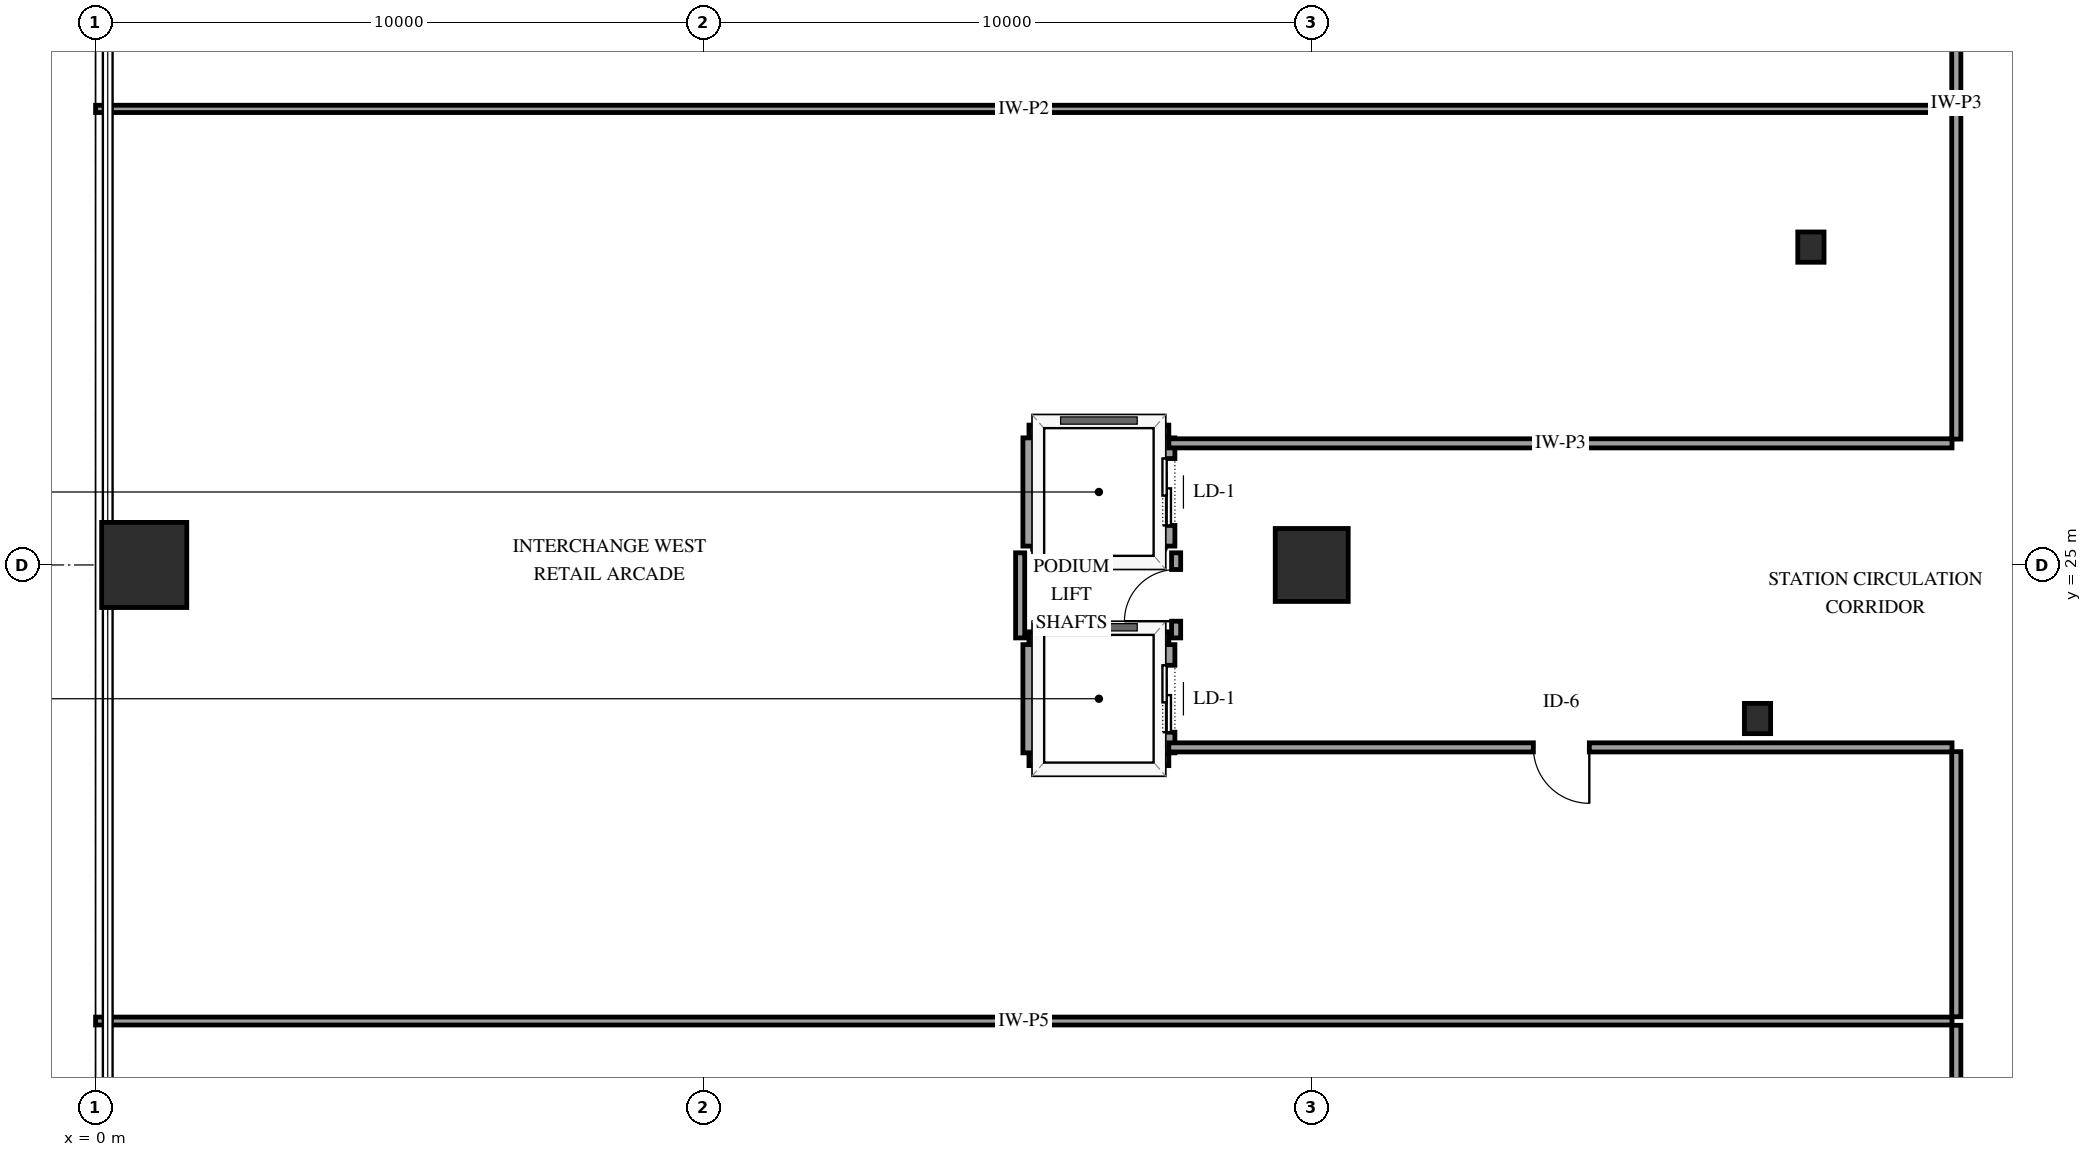
"""IFC4 building model, lengths in metres.
Left out: names, types, materials, properties, quantities, classifications, styles, units other than length and angle.
Written with IfcOpenShell. Run it as: python <this file> out.ifc"""

import sys

from ifc_helpers import new_model, si_unit, direction, frame, frame_2d, origin, origin_2d, place, context, subcontext, project, spatial, rectangle, i_section, extrude, element, fill, save


model = new_model("IFC4")
c1 = context("Model", 3, precision=1e-05, world=origin(), true_north=direction((0.0, 1.0)))
c2 = subcontext(c1, "Body", "Model", "MODEL_VIEW")
j1 = project(units=[si_unit("LENGTHUNIT", "METRE"), si_unit("PLANEANGLEUNIT", "RADIAN")], contexts=[c1])
p1 = place(None, origin())
s1 = spatial("IfcSite", under=j1, at=p1, CompositionType="ELEMENT")
p2 = place(p1, origin())
s2 = spatial("IfcBuilding", under=s1, at=p2, CompositionType="ELEMENT")
p3 = place(p2, frame((0.0, 0.0, 20.7)))
s3 = spatial("IfcBuildingStorey", under=s2, at=p3, CompositionType="ELEMENT", Elevation=20.7)
p4 = place(p3, frame((0.8, 25.0, 0.0), z_axis=(0.0, 0.0, 1.0), x_axis=(1.0, 0.0, 0.0)))
e1 = element("IfcColumn", 1, at=p4, inside=s3, PredefinedType="COLUMN", context=c2, shape_type="SweptSolid", body=[
    extrude(rectangle(XDim=1.4, YDim=1.4, at=origin_2d()), origin(), (0.0, 0.0, 1.0), 4.5),
])
p5 = place(p3, frame((20.0, 25.0, 0.0), z_axis=(0.0, 0.0, 1.0), x_axis=(1.0, 0.0, 0.0)))
e2 = element("IfcColumn", 2, at=p5, inside=s3, PredefinedType="COLUMN", context=c2, shape_type="SweptSolid", body=[
    extrude(rectangle(XDim=1.2, YDim=1.2, at=origin_2d()), origin(), (0.0, 0.0, 1.0), 4.5),
])
for number, where, z_axis, x_axis in (
    (3, (28.209, 30.227, 0.0), (0.0, 0.0, 1.0), (1.0, 0.0, 0.0)),
    (4, (27.331, 22.475, 0.0), (0.0, 0.0, 1.0), (1.0, 0.0, 0.0)),
):
    element("IfcColumn", number, at=place(p3, frame(where, z_axis=z_axis, x_axis=x_axis)), inside=s3, PredefinedType="COLUMN", context=c2, shape_type="SweptSolid", body=[
        extrude(i_section(OverallWidth=0.432, OverallDepth=0.498, WebThickness=0.056, FlangeThickness=0.089, FilletRadius=0.038, at=origin_2d()), origin(), (0.0, 0.0, 1.0), 4.5),
    ])
for number, where, z_axis, x_axis in (
    (5, (15.35, 21.8, 0.0), (0.0, 0.0, 1.0), (1.0, 0.0, 0.0)),
    (6, (15.35, 23.8, 0.0), (0.0, 0.0, 1.0), (1.0, 0.0, 0.0)),
):
    element("IfcWall", number, at=place(p3, frame(where, z_axis=z_axis, x_axis=x_axis)), inside=s3, PredefinedType="SOLIDWALL", context=c2, shape_type="SweptSolid", body=[
        extrude(rectangle(XDim=2.3, YDim=0.2, at=frame_2d((1.15, 0.0))), origin(), (0.0, 0.0, 1.0), 4.18),
    ])
p6 = place(p3, frame((15.35, 21.91, 0.0), z_axis=(0.0, 0.0, 1.0), x_axis=(0.0, 1.0, 0.0)))
e7 = element("IfcWall", 7, at=p6, inside=s3, PredefinedType="SOLIDWALL", context=c2, shape_type="SweptSolid", body=[
    extrude(rectangle(XDim=1.78, YDim=0.2, at=frame_2d((0.89, 0.0))), origin(), (0.0, 0.0, 1.0), 4.18),
])
p7 = place(p3, frame((17.65, 21.91, 0.0), z_axis=(0.0, 0.0, 1.0), x_axis=(0.0, 1.0, 0.0)))
e8 = element("IfcWall", 8, at=p7, inside=s3, PredefinedType="SOLIDWALL", context=c2, shape_type="SweptSolid", body=[
    extrude(rectangle(XDim=1.78, YDim=0.2, at=frame_2d((0.89, 0.0))), origin(), (0.0, 0.0, 1.0), 4.18),
])
p8 = place(p7, frame((0.34, 0.0, 0.0)))
e9 = element("IfcOpeningElement", 9, at=p8, cuts=e8, PredefinedType="OPENING", context=c2, shape_type="SweptSolid", body=[
    extrude(rectangle(XDim=1.1, YDim=2.15, at=frame_2d((0.55, 1.075))), frame((0.0, 0.11, 0.0), z_axis=(0.0, -1.0, 0.0), x_axis=(1.0, 0.0, 0.0)), (0.0, 0.0, 1.0), 0.22),
])
p9 = place(p3, frame((15.35, 27.2, 0.0), z_axis=(0.0, 0.0, 1.0), x_axis=(1.0, 0.0, 0.0)))
e10 = element("IfcWall", 10, at=p9, inside=s3, PredefinedType="SOLIDWALL", context=c2, shape_type="SweptSolid", body=[
    extrude(rectangle(XDim=2.3, YDim=0.2, at=frame_2d((1.15, 0.0))), origin(), (0.0, 0.0, 1.0), 4.18),
])
p10 = place(p3, frame((15.35, 25.31, 0.0), z_axis=(0.0, 0.0, 1.0), x_axis=(0.0, 1.0, 0.0)))
e11 = element("IfcWall", 11, at=p10, inside=s3, PredefinedType="SOLIDWALL", context=c2, shape_type="SweptSolid", body=[
    extrude(rectangle(XDim=1.78, YDim=0.2, at=frame_2d((0.89, 0.0))), origin(), (0.0, 0.0, 1.0), 4.18),
])
p11 = place(p3, frame((17.65, 25.31, 0.0), z_axis=(0.0, 0.0, 1.0), x_axis=(0.0, 1.0, 0.0)))
e12 = element("IfcWall", 12, at=p11, inside=s3, PredefinedType="SOLIDWALL", context=c2, shape_type="SweptSolid", body=[
    extrude(rectangle(XDim=1.78, YDim=0.2, at=frame_2d((0.89, 0.0))), origin(), (0.0, 0.0, 1.0), 4.18),
])
p12 = place(p11, frame((0.34, 0.0, 0.0)))
e13 = element("IfcOpeningElement", 13, at=p12, cuts=e12, PredefinedType="OPENING", context=c2, shape_type="SweptSolid", body=[
    extrude(rectangle(XDim=1.1, YDim=2.15, at=frame_2d((0.55, 1.075))), frame((0.0, 0.11, 0.0), z_axis=(0.0, -1.0, 0.0), x_axis=(1.0, 0.0, 0.0)), (0.0, 0.0, 1.0), 0.22),
])
p13 = place(p3, frame((0.0, 17.5, 0.0), z_axis=(0.0, 0.0, 1.0), x_axis=(1.0, 0.0, 0.0)))
e14 = element("IfcWall", 14, at=p13, inside=s3, PredefinedType="PARTITIONING", context=c2, shape_type="SweptSolid", body=[
    extrude(rectangle(XDim=30.53, YDim=0.13, at=frame_2d((15.265, 0.0))), origin(), (0.0, 0.0, 1.0), 4.18),
])
p14 = place(p3, frame((0.0, 32.5, 0.0), z_axis=(0.0, 0.0, 1.0), x_axis=(1.0, 0.0, 0.0)))
e15 = element("IfcWall", 15, at=p14, inside=s3, PredefinedType="PARTITIONING", context=c2, shape_type="SweptSolid", body=[
    extrude(rectangle(XDim=30.53, YDim=0.12, at=frame_2d((15.265, 0.0))), origin(), (0.0, 0.0, 1.0), 4.18),
])
p15 = place(p3, frame((30.53, 22.0, 0.0), z_axis=(0.0, 0.0, 1.0), x_axis=(-1.0, 0.0, 0.0)))
e16 = element("IfcWall", 16, at=p15, inside=s3, PredefinedType="PARTITIONING", context=c2, shape_type="SweptSolid", body=[
    extrude(rectangle(XDim=12.88, YDim=0.15, at=frame_2d((6.44, 0.0))), origin(), (0.0, 0.0, 1.0), 4.18),
])
p16 = place(p15, frame((5.965, 0.0, 0.0)))
e17 = element("IfcOpeningElement", 17, at=p16, cuts=e16, PredefinedType="OPENING", context=c2, shape_type="SweptSolid", body=[
    extrude(rectangle(XDim=0.92, YDim=2.12, at=frame_2d((0.46, 1.06))), frame((0.0, 0.085, 0.0), z_axis=(0.0, -1.0, 0.0), x_axis=(1.0, 0.0, 0.0)), (0.0, 0.0, 1.0), 0.17),
])
p17 = place(p3, frame((17.65, 27.0, 0.0), z_axis=(0.0, 0.0, 1.0), x_axis=(1.0, 0.0, 0.0)))
e18 = element("IfcWall", 18, at=p17, inside=s3, PredefinedType="PARTITIONING", context=c2, shape_type="SweptSolid", body=[
    extrude(rectangle(XDim=12.88, YDim=0.15, at=frame_2d((6.44, 0.0))), origin(), (0.0, 0.0, 1.0), 4.18),
])
p18 = place(p3, frame((30.6, 7.07, 0.0), z_axis=(0.0, 0.0, 1.0), x_axis=(0.0, 1.0, 0.0)))
e19 = element("IfcWall", 19, at=p18, inside=s3, PredefinedType="PARTITIONING", context=c2, shape_type="SweptSolid", body=[
    extrude(rectangle(XDim=10.36, YDim=0.15, at=frame_2d((5.18, 0.0))), origin(), (0.0, 0.0, 1.0), 4.18),
])
p19 = place(p3, frame((30.6, 32.57, 0.0), z_axis=(0.0, 0.0, 1.0), x_axis=(0.0, 1.0, 0.0)))
e20 = element("IfcWall", 20, at=p19, inside=s3, PredefinedType="PARTITIONING", context=c2, shape_type="SweptSolid", body=[
    extrude(rectangle(XDim=5.56, YDim=0.15, at=frame_2d((2.78, 0.0))), origin(), (0.0, 0.0, 1.0), 4.18),
])
p20 = place(p3, frame((30.6, 27.07, 0.0), z_axis=(0.0, 0.0, 1.0), x_axis=(0.0, 1.0, 0.0)))
e21 = element("IfcWall", 21, at=p20, inside=s3, PredefinedType="PARTITIONING", context=c2, shape_type="SweptSolid", body=[
    extrude(rectangle(XDim=5.36, YDim=0.15, at=frame_2d((2.68, 0.0))), origin(), (0.0, 0.0, 1.0), 4.18),
])
p21 = place(p3, frame((30.6, 17.57, 0.0), z_axis=(0.0, 0.0, 1.0), x_axis=(0.0, 1.0, 0.0)))
e22 = element("IfcWall", 22, at=p21, inside=s3, PredefinedType="PARTITIONING", context=c2, shape_type="SweptSolid", body=[
    extrude(rectangle(XDim=4.36, YDim=0.15, at=frame_2d((2.18, 0.0))), origin(), (0.0, 0.0, 1.0), 4.18),
])
p22 = place(p3, frame((17.77, 23.8, 0.0), z_axis=(0.0, 0.0, 1.0), x_axis=(0.0, 1.0, 0.0)))
e23 = element("IfcWall", 23, at=p22, inside=s3, PredefinedType="PARTITIONING", context=c2, shape_type="SweptSolid", body=[
    extrude(rectangle(XDim=1.4, YDim=0.15, at=frame_2d((0.7, 0.0))), origin(), (0.0, 0.0, 1.0), 4.18),
])
p23 = place(p22, frame((0.275, 0.0, 0.0)))
e24 = element("IfcOpeningElement", 24, at=p23, cuts=e23, PredefinedType="OPENING", context=c2, shape_type="SweptSolid", body=[
    extrude(rectangle(XDim=0.85, YDim=2.1, at=frame_2d((0.425, 1.05))), frame((0.0, 0.085, 0.0), z_axis=(0.0, -1.0, 0.0), x_axis=(1.0, 0.0, 0.0)), (0.0, 0.0, 1.0), 0.17),
])
p24 = place(p3, frame((15.205, 23.8, 0.0), z_axis=(0.0, 0.0, 1.0), x_axis=(0.0, 1.0, 0.0)))
e25 = element("IfcWall", 25, at=p24, inside=s3, PredefinedType="PARTITIONING", context=c2, shape_type="SweptSolid", body=[
    extrude(rectangle(XDim=1.4, YDim=0.15, at=frame_2d((0.7, 0.0))), origin(), (0.0, 0.0, 1.0), 4.18),
])
p25 = place(p8, origin())
e26 = element("IfcDoor", 26, at=p25, inside=s3, OperationType="SLIDING_TO_LEFT", PredefinedType="DOOR", context=c2, shape_type="SweptSolid", body=[
    extrude(rectangle(XDim=1.1, YDim=2.15, at=frame_2d((0.55, 1.075))), frame((0.0, 0.025, 0.0), z_axis=(0.0, -1.0, 0.0), x_axis=(1.0, 0.0, 0.0)), (0.0, 0.0, 1.0), 0.05),
])
fill(e9, e26)
p26 = place(p12, origin())
e27 = element("IfcDoor", 27, at=p26, inside=s3, OperationType="SLIDING_TO_LEFT", PredefinedType="DOOR", context=c2, shape_type="SweptSolid", body=[
    extrude(rectangle(XDim=1.1, YDim=2.15, at=frame_2d((0.55, 1.075))), frame((0.0, 0.025, 0.0), z_axis=(0.0, -1.0, 0.0), x_axis=(1.0, 0.0, 0.0)), (0.0, 0.0, 1.0), 0.05),
])
fill(e13, e27)
p27 = place(p16, origin())
e28 = element("IfcDoor", 28, at=p27, inside=s3, OperationType="SINGLE_SWING_LEFT", PredefinedType="DOOR", context=c2, shape_type="SweptSolid", body=[
    extrude(rectangle(XDim=0.92, YDim=2.12, at=frame_2d((0.46, 1.06))), frame((0.0, 0.025, 0.0), z_axis=(0.0, -1.0, 0.0), x_axis=(1.0, 0.0, 0.0)), (0.0, 0.0, 1.0), 0.05),
])
fill(e17, e28)
p28 = place(p23, origin())
e29 = element("IfcDoor", 29, at=p28, inside=s3, OperationType="SINGLE_SWING_LEFT", PredefinedType="DOOR", context=c2, shape_type="SweptSolid", body=[
    extrude(rectangle(XDim=0.85, YDim=2.1, at=frame_2d((0.425, 1.05))), frame((0.0, 0.025, 0.0), z_axis=(0.0, -1.0, 0.0), x_axis=(1.0, 0.0, 0.0)), (0.0, 0.0, 1.0), 0.05),
])
fill(e24, e29)
save(model, sys.argv[1])
